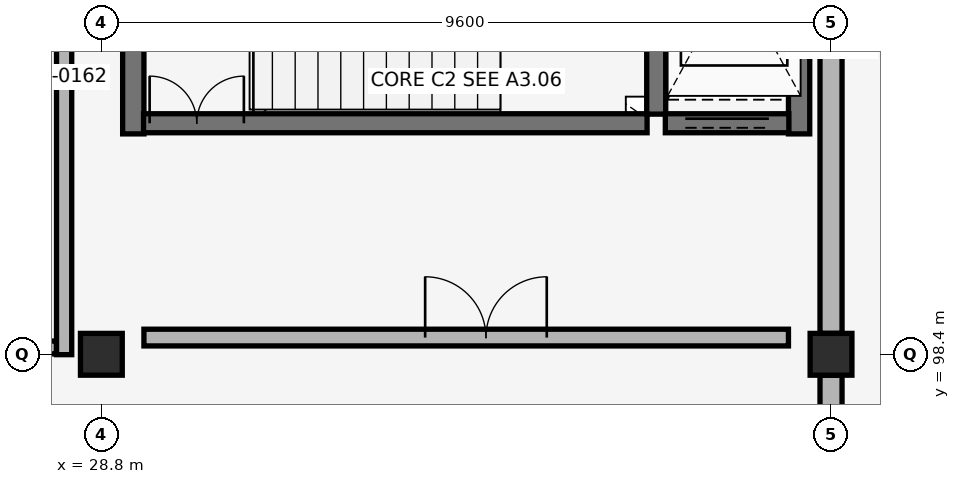
"""IFC4 building model, lengths in metres.
Left out: names, types, materials, properties, quantities, classifications, styles, units other than length and angle.
Written with IfcOpenShell. Run it as: python <this file> out.ifc"""

import sys

from ifc_helpers import new_model, si_unit, direction, frame, frame_2d, origin, origin_2d, place, context, subcontext, project, spatial, rectangle, extrude, element, fill, save


model = new_model("IFC4")
c1 = context("Model", 3, precision=1e-05, world=origin(), true_north=direction((0.0, 1.0)))
c2 = subcontext(c1, "Body", "Model", "MODEL_VIEW")
j1 = project(units=[si_unit("LENGTHUNIT", "METRE"), si_unit("PLANEANGLEUNIT", "RADIAN")], contexts=[c1])
p1 = place(None, origin())
s1 = spatial("IfcSite", under=j1, at=p1, CompositionType="ELEMENT")
p2 = place(p1, origin())
s2 = spatial("IfcBuilding", under=s1, at=p2, CompositionType="ELEMENT")
p3 = place(p2, frame((0.0, 0.0, 16.66)))
s3 = spatial("IfcBuildingStorey", under=s2, at=p3, CompositionType="ELEMENT", Elevation=16.66)
for number, where, z_axis, x_axis in (
    (1, (28.8, 98.4, 0.0), (0.0, 0.0, 1.0), (1.0, 0.0, 0.0)),
    (2, (38.4, 98.4, 0.0), (0.0, 0.0, 1.0), (1.0, 0.0, 0.0)),
):
    element("IfcColumn", number, at=place(p3, frame(where, z_axis=z_axis, x_axis=x_axis)), inside=s3, PredefinedType="COLUMN", context=c2, shape_type="SweptSolid", body=[
        extrude(rectangle(XDim=0.55, YDim=0.55, at=origin_2d()), origin(), (0.0, 0.0, 1.0), 4.08),
    ])
p4 = place(p3, frame((38.4, 91.475, 0.0), z_axis=(0.0, 0.0, 1.0), x_axis=(0.0, 1.0, 0.0)))
e3 = element("IfcWall", 3, at=p4, inside=s3, PredefinedType="SOLIDWALL", context=c2, shape_type="SweptSolid", body=[
    extrude(rectangle(XDim=6.65, YDim=0.29, at=frame_2d((3.325, 0.0))), origin(), (0.0, 0.0, 1.0), 3.08),
])
p5 = place(p4, frame((1.153, 0.0, 0.88)))
e4 = element("IfcOpeningElement", 4, at=p5, cuts=e3, PredefinedType="OPENING", context=c2, shape_type="SweptSolid", body=[
    extrude(rectangle(XDim=1.02, YDim=1.88, at=frame_2d((0.51, 0.94))), frame((0.0, 0.155, 0.0), z_axis=(0.0, -1.0, 0.0), x_axis=(1.0, 0.0, 0.0)), (0.0, 0.0, 1.0), 0.31),
])
p6 = place(p4, frame((2.815, 0.0, 0.88)))
e5 = element("IfcOpeningElement", 5, at=p6, cuts=e3, PredefinedType="OPENING", context=c2, shape_type="SweptSolid", body=[
    extrude(rectangle(XDim=1.02, YDim=1.88, at=frame_2d((0.51, 0.94))), frame((0.0, 0.155, 0.0), z_axis=(0.0, -1.0, 0.0), x_axis=(1.0, 0.0, 0.0)), (0.0, 0.0, 1.0), 0.31),
])
p7 = place(p4, frame((4.478, 0.0, 0.88)))
e6 = element("IfcOpeningElement", 6, at=p7, cuts=e3, PredefinedType="OPENING", context=c2, shape_type="SweptSolid", body=[
    extrude(rectangle(XDim=1.02, YDim=1.88, at=frame_2d((0.51, 0.94))), frame((0.0, 0.155, 0.0), z_axis=(0.0, -1.0, 0.0), x_axis=(1.0, 0.0, 0.0)), (0.0, 0.0, 1.0), 0.31),
])
p8 = place(p3, frame((38.4, 98.675, 0.0), z_axis=(0.0, 0.0, 1.0), x_axis=(0.0, 1.0, 0.0)))
e7 = element("IfcWall", 7, at=p8, inside=s3, PredefinedType="SOLIDWALL", context=c2, shape_type="SweptSolid", body=[
    extrude(rectangle(XDim=6.65, YDim=0.29, at=frame_2d((3.325, 0.0))), origin(), (0.0, 0.0, 1.0), 3.08),
])
for number, where, z_axis, x_axis in (
    (8, (29.22, 101.3, 0.0), (0.0, 0.0, 1.0), (0.0, 1.0, 0.0)),
    (9, (37.98, 101.3, 0.0), (0.0, 0.0, 1.0), (0.0, 1.0, 0.0)),
):
    element("IfcWall", number, at=place(p3, frame(where, z_axis=z_axis, x_axis=x_axis)), inside=s3, PredefinedType="SHEAR", context=c2, shape_type="SweptSolid", body=[
        extrude(rectangle(XDim=4.08, YDim=0.28, at=frame_2d((2.04, 0.0))), origin(), (0.0, 0.0, 1.0), 3.8),
    ])
p9 = place(p3, frame((36.1, 101.56, 0.0), z_axis=(0.0, 0.0, 1.0), x_axis=(0.0, 1.0, 0.0)))
e10 = element("IfcWall", 10, at=p9, inside=s3, PredefinedType="SHEAR", context=c2, shape_type="SweptSolid", body=[
    extrude(rectangle(XDim=3.54, YDim=0.25, at=frame_2d((1.77, 0.0))), origin(), (0.0, 0.0, 1.0), 3.8),
])
p10 = place(p3, frame((29.355, 101.44, 0.0), z_axis=(0.0, 0.0, 1.0), x_axis=(1.0, 0.0, 0.0)))
e11 = element("IfcWall", 11, at=p10, inside=s3, PredefinedType="SHEAR", context=c2, shape_type="SweptSolid", body=[
    extrude(rectangle(XDim=6.625, YDim=0.25, at=frame_2d((3.312, 0.0))), origin(), (0.0, 0.0, 1.0), 3.8),
])
p11 = place(p10, frame((0.08, 0.0, 0.0)))
e12 = element("IfcOpeningElement", 12, at=p11, cuts=e11, PredefinedType="OPENING", context=c2, shape_type="SweptSolid", body=[
    extrude(rectangle(XDim=1.24, YDim=2.15, at=frame_2d((0.62, 1.075))), frame((0.0, 0.135, 0.0), z_axis=(0.0, -1.0, 0.0), x_axis=(1.0, 0.0, 0.0)), (0.0, 0.0, 1.0), 0.27),
])
p12 = place(p3, frame((29.36, 98.62, 0.0), z_axis=(0.0, 0.0, 1.0), x_axis=(1.0, 0.0, 0.0)))
e13 = element("IfcWall", 13, at=p12, inside=s3, PredefinedType="PARTITIONING", context=c2, shape_type="SweptSolid", body=[
    extrude(rectangle(XDim=8.48, YDim=0.22, at=frame_2d((4.24, 0.0))), origin(), (0.0, 0.0, 1.0), 3.13),
])
p13 = place(p12, frame((3.7, 0.0, 0.0)))
e14 = element("IfcOpeningElement", 14, at=p13, cuts=e13, PredefinedType="OPENING", context=c2, shape_type="SweptSolid", body=[
    extrude(rectangle(XDim=1.6, YDim=2.2, at=frame_2d((0.8, 1.1))), frame((0.0, 0.12, 0.0), z_axis=(0.0, -1.0, 0.0), x_axis=(1.0, 0.0, 0.0)), (0.0, 0.0, 1.0), 0.24),
])
p14 = place(p3, frame((36.22, 101.44, 0.0), z_axis=(0.0, 0.0, 1.0), x_axis=(1.0, 0.0, 0.0)))
e15 = element("IfcWall", 15, at=p14, inside=s3, PredefinedType="SHEAR", context=c2, shape_type="SweptSolid", body=[
    extrude(rectangle(XDim=1.625, YDim=0.25, at=frame_2d((0.812, 0.0))), origin(), (0.0, 0.0, 1.0), 3.8),
])
p15 = place(p14, frame((0.262, 0.0, 0.0)))
e16 = element("IfcOpeningElement", 16, at=p15, cuts=e15, PredefinedType="OPENING", context=c2, shape_type="SweptSolid", body=[
    extrude(rectangle(XDim=1.1, YDim=2.15, at=frame_2d((0.55, 1.075))), frame((0.0, 0.135, 0.0), z_axis=(0.0, -1.0, 0.0), x_axis=(1.0, 0.0, 0.0)), (0.0, 0.0, 1.0), 0.27),
])
p16 = place(p3, frame((28.31, 98.395, 0.0), z_axis=(0.0, 0.0, 1.0), x_axis=(0.0, 1.0, 0.0)))
e17 = element("IfcWall", 17, at=p16, inside=s3, PredefinedType="PLUMBINGWALL", context=c2, shape_type="SweptSolid", body=[
    extrude(rectangle(XDim=6.41, YDim=0.2, at=frame_2d((3.205, 0.0))), origin(), (0.0, 0.0, 1.0), 3.12),
])
p17 = place(p3, frame((24.197, 98.49, 0.0), z_axis=(0.0, 0.0, 1.0), x_axis=(1.0, 0.0, 0.0)))
e18 = element("IfcWall", 18, at=p17, inside=s3, PredefinedType="PLUMBINGWALL", context=c2, shape_type="SweptSolid", body=[
    extrude(rectangle(XDim=4.011, YDim=0.17, at=frame_2d((2.005, 0.0))), origin(), (0.0, 0.0, 1.0), 3.12),
])
p18 = place(p17, frame((1.545, 0.0, 0.0)))
e19 = element("IfcOpeningElement", 19, at=p18, cuts=e18, PredefinedType="OPENING", context=c2, shape_type="SweptSolid", body=[
    extrude(rectangle(XDim=0.92, YDim=2.08, at=frame_2d((0.46, 1.04))), frame((0.0, 0.095, 0.0), z_axis=(0.0, -1.0, 0.0), x_axis=(1.0, 0.0, 0.0)), (0.0, 0.0, 1.0), 0.19),
])
p19 = place(p11, origin())
e20 = element("IfcDoor", 20, at=p19, inside=s3, OperationType="DOUBLE_DOOR_SINGLE_SWING", PredefinedType="DOOR", context=c2, shape_type="SweptSolid", body=[
    extrude(rectangle(XDim=1.24, YDim=2.15, at=frame_2d((0.62, 1.075))), frame((0.0, 0.025, 0.0), z_axis=(0.0, -1.0, 0.0), x_axis=(1.0, 0.0, 0.0)), (0.0, 0.0, 1.0), 0.05),
])
fill(e12, e20)
p20 = place(p13, origin())
e21 = element("IfcDoor", 21, at=p20, inside=s3, OperationType="DOUBLE_DOOR_SINGLE_SWING", PredefinedType="DOOR", context=c2, shape_type="SweptSolid", body=[
    extrude(rectangle(XDim=1.6, YDim=2.2, at=frame_2d((0.8, 1.1))), frame((0.0, 0.025, 0.0), z_axis=(0.0, -1.0, 0.0), x_axis=(1.0, 0.0, 0.0)), (0.0, 0.0, 1.0), 0.05),
])
fill(e14, e21)
p21 = place(p15, origin())
e22 = element("IfcDoor", 22, at=p21, inside=s3, OperationType="DOUBLE_DOOR_SLIDING", PredefinedType="DOOR", context=c2, shape_type="SweptSolid", body=[
    extrude(rectangle(XDim=1.1, YDim=2.15, at=frame_2d((0.55, 1.075))), frame((0.0, 0.025, 0.0), z_axis=(0.0, -1.0, 0.0), x_axis=(1.0, 0.0, 0.0)), (0.0, 0.0, 1.0), 0.05),
])
fill(e16, e22)
save(model, sys.argv[1])
